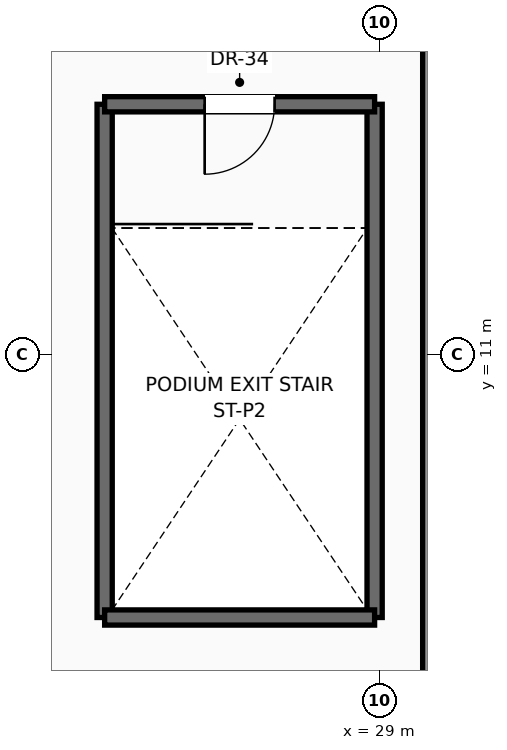
"""IFC4 building model, lengths in metres.
Left out: names, types, materials, properties, quantities, classifications, styles, units other than length and angle.
Written with IfcOpenShell. Run it as: python <this file> out.ifc"""

import sys

from ifc_helpers import new_model, si_unit, direction, frame, frame_2d, origin, place, context, subcontext, project, spatial, rectangle, extrude, source, transform, mapped, element, fill, save


model = new_model("IFC4")
c1 = context("Model", 3, precision=1e-05, world=origin(), true_north=direction((0.0, 1.0)))
c2 = subcontext(c1, "Body", "Model", "MODEL_VIEW")
j1 = project(units=[si_unit("LENGTHUNIT", "METRE"), si_unit("PLANEANGLEUNIT", "RADIAN")], contexts=[c1])
p1 = place(None, origin())
s1 = spatial("IfcSite", under=j1, at=p1, CompositionType="ELEMENT")
p2 = place(p1, origin())
s2 = spatial("IfcBuilding", under=s1, at=p2, CompositionType="ELEMENT")
p3 = place(p2, frame((0.0, 0.0, 16.5)))
s3 = spatial("IfcBuildingStorey", under=s2, at=p3, CompositionType="ELEMENT", Elevation=16.5)
p4 = place(p3, frame((29.9, 38.65, 0.0), z_axis=(0.0, 0.0, 1.0), x_axis=(0.0, -1.0, 0.0)))
e1 = element("IfcWall", 1, at=p4, inside=s3, PredefinedType="SOLIDWALL", context=c2, shape_type="SweptSolid", body=[
    extrude(rectangle(XDim=33.6, YDim=0.38, at=frame_2d((16.8, 0.0))), origin(), (0.0, 0.0, 1.0), 3.99),
])
p5 = place(p4, frame((15.25, 0.0, 0.95)))
e2 = element("IfcOpeningElement", 2, at=p5, cuts=e1, PredefinedType="OPENING", context=c2, shape_type="SweptSolid", body=[
    extrude(rectangle(XDim=1.8, YDim=2.4, at=frame_2d((0.9, 1.2))), frame((0.0, 0.2, 0.0), z_axis=(0.0, -1.0, 0.0), x_axis=(1.0, 0.0, 0.0)), (0.0, 0.0, 1.0), 0.4),
])
p6 = place(p4, frame((4.75, 0.0, 0.95)))
e3 = element("IfcOpeningElement", 3, at=p6, cuts=e1, PredefinedType="OPENING", context=c2, shape_type="SweptSolid", body=[
    extrude(rectangle(XDim=1.8, YDim=2.4, at=frame_2d((0.9, 1.2))), frame((0.0, 0.2, 0.0), z_axis=(0.0, -1.0, 0.0), x_axis=(1.0, 0.0, 0.0)), (0.0, 0.0, 1.0), 0.4),
])
for number, where, z_axis, x_axis in (
    (4, (24.48, 6.68, 0.0), (0.0, 0.0, 1.0), (0.0, 1.0, 0.0)),
    (5, (28.92, 6.68, 0.0), (0.0, 0.0, 1.0), (0.0, 1.0, 0.0)),
):
    element("IfcWall", number, at=place(p3, frame(where, z_axis=z_axis, x_axis=x_axis)), inside=s3, PredefinedType="SOLIDWALL", context=c2, shape_type="SweptSolid", body=[
        extrude(rectangle(XDim=8.44, YDim=0.25, at=frame_2d((4.22, 0.0))), origin(), (0.0, 0.0, 1.0), 5.05),
    ])
p7 = place(p3, frame((24.48, 6.68, 0.0), z_axis=(0.0, 0.0, 1.0), x_axis=(1.0, 0.0, 0.0)))
e6 = element("IfcWall", 6, at=p7, inside=s3, PredefinedType="SOLIDWALL", context=c2, shape_type="SweptSolid", body=[
    extrude(rectangle(XDim=4.44, YDim=0.25, at=frame_2d((2.22, 0.0))), origin(), (0.0, 0.0, 1.0), 5.05),
])
p8 = place(p3, frame((28.92, 15.12, 0.0), z_axis=(0.0, 0.0, 1.0), x_axis=(-1.0, 0.0, 0.0)))
e7 = element("IfcWall", 7, at=p8, inside=s3, PredefinedType="SOLIDWALL", context=c2, shape_type="SweptSolid", body=[
    extrude(rectangle(XDim=4.44, YDim=0.25, at=frame_2d((2.22, 0.0))), origin(), (0.0, 0.0, 1.0), 5.05),
])
p9 = place(p8, frame((1.645, 0.0, 0.0)))
e8 = element("IfcOpeningElement", 8, at=p9, cuts=e7, PredefinedType="OPENING", context=c2, shape_type="SweptSolid", body=[
    extrude(rectangle(XDim=1.15, YDim=2.2, at=frame_2d((0.575, 1.1))), frame((0.0, 0.135, 0.0), z_axis=(0.0, -1.0, 0.0), x_axis=(1.0, 0.0, 0.0)), (0.0, 0.0, 1.0), 0.27),
])
m1 = source(origin(), c2, "Body", "SweptSolid", [
    extrude(rectangle(XDim=1.15, YDim=2.2, at=frame_2d((0.575, 1.1))), frame((0.0, 0.025, 0.0), z_axis=(0.0, -1.0, 0.0), x_axis=(1.0, 0.0, 0.0)), (0.0, 0.0, 1.0), 0.05),
])
p10 = place(p9, origin())
e9 = element("IfcDoor", 9, at=p10, inside=s3, OperationType="SINGLE_SWING_RIGHT", PredefinedType="DOOR", context=c2, shape_type="MappedRepresentation", body=[
    mapped(m1, transform((0.0, 0.0, 0.0), scale=1.0)),
])
fill(e8, e9)
save(model, sys.argv[1])
